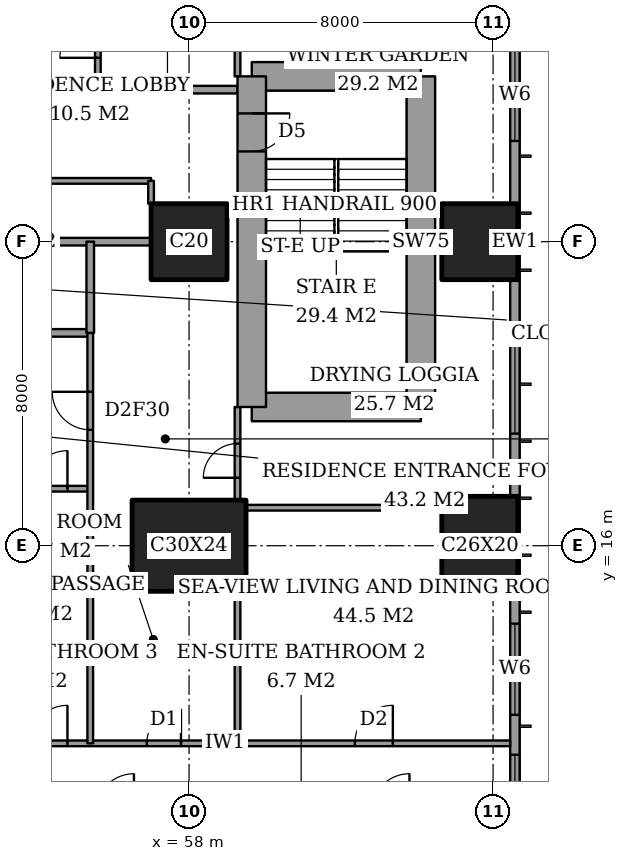
"""IFC4 building model, lengths in metres.
Left out: names, types, materials, properties, quantities, classifications, styles, units other than length and angle.
Written with IfcOpenShell. Run it as: python <this file> out.ifc"""

import sys

from ifc_helpers import new_model, si_unit, direction, frame, frame_2d, origin, origin_2d, place, context, subcontext, project, spatial, rectangle, extrude, element, fill, save


model = new_model("IFC4")
c1 = context("Model", 3, precision=1e-05, world=origin(), true_north=direction((0.0, 1.0)))
c2 = subcontext(c1, "Body", "Model", "MODEL_VIEW")
j1 = project(units=[si_unit("LENGTHUNIT", "METRE"), si_unit("PLANEANGLEUNIT", "RADIAN")], contexts=[c1])
p1 = place(None, origin())
s1 = spatial("IfcSite", under=j1, at=p1, CompositionType="ELEMENT")
p2 = place(p1, origin())
s2 = spatial("IfcBuilding", under=s1, at=p2, CompositionType="ELEMENT")
p3 = place(p2, frame((0.0, 0.0, 51.2)))
s3 = spatial("IfcBuildingStorey", under=s2, at=p3, CompositionType="ELEMENT", Elevation=51.2)
p4 = place(p3, frame((58.0, 16.0, 0.0), z_axis=(0.0, 0.0, 1.0), x_axis=(1.0, 0.0, 0.0)))
e1 = element("IfcColumn", 1, at=p4, inside=s3, PredefinedType="COLUMN", context=c2, shape_type="SweptSolid", body=[
    extrude(rectangle(XDim=3.0, YDim=2.4, at=origin_2d()), origin(), (0.0, 0.0, 1.0), 3.6),
])
p5 = place(p3, frame((58.0, 24.0, 0.0), z_axis=(0.0, 0.0, 1.0), x_axis=(1.0, 0.0, 0.0)))
e2 = element("IfcColumn", 2, at=p5, inside=s3, PredefinedType="COLUMN", context=c2, shape_type="SweptSolid", body=[
    extrude(rectangle(XDim=2.0, YDim=2.0, at=origin_2d()), origin(), (0.0, 0.0, 1.0), 3.6),
])
p6 = place(p3, frame((65.65, 16.0, 0.0), z_axis=(0.0, 0.0, 1.0), x_axis=(0.0, 1.0, 0.0)))
e3 = element("IfcColumn", 3, at=p6, inside=s3, PredefinedType="COLUMN", context=c2, shape_type="SweptSolid", body=[
    extrude(rectangle(XDim=2.6, YDim=2.0, at=origin_2d()), origin(), (0.0, 0.0, 1.0), 3.6),
])
p7 = place(p3, frame((65.65, 24.0, 0.0), z_axis=(0.0, 0.0, 1.0), x_axis=(1.0, 0.0, 0.0)))
e4 = element("IfcColumn", 4, at=p7, inside=s3, PredefinedType="COLUMN", context=c2, shape_type="SweptSolid", body=[
    extrude(rectangle(XDim=2.0, YDim=2.0, at=origin_2d()), origin(), (0.0, 0.0, 1.0), 3.6),
])
p8 = place(p3, frame((59.65, 19.65, 0.0), z_axis=(0.0, 0.0, 1.0), x_axis=(1.0, 0.0, 0.0)))
e5 = element("IfcWall", 5, at=p8, inside=s3, PredefinedType="SHEAR", context=c2, shape_type="SweptSolid", body=[
    extrude(rectangle(XDim=4.45, YDim=0.75, at=frame_2d((2.225, 0.0))), origin(), (0.0, 0.0, 1.0), 3.6),
])
p9 = place(p3, frame((64.1, 19.65, 0.0), z_axis=(0.0, 0.0, 1.0), x_axis=(0.0, 1.0, 0.0)))
e6 = element("IfcWall", 6, at=p9, inside=s3, PredefinedType="SHEAR", context=c2, shape_type="SweptSolid", body=[
    extrude(rectangle(XDim=8.7, YDim=0.75, at=frame_2d((4.35, 0.0))), origin(), (0.0, 0.0, 1.0), 3.6),
])
p10 = place(p3, frame((64.1, 28.35, 0.0), z_axis=(0.0, 0.0, 1.0), x_axis=(-1.0, 0.0, 0.0)))
e7 = element("IfcWall", 7, at=p10, inside=s3, PredefinedType="SHEAR", context=c2, shape_type="SweptSolid", body=[
    extrude(rectangle(XDim=4.45, YDim=0.75, at=frame_2d((2.225, 0.0))), origin(), (0.0, 0.0, 1.0), 3.6),
])
p11 = place(p3, frame((59.65, 28.35, 0.0), z_axis=(0.0, 0.0, 1.0), x_axis=(0.0, -1.0, 0.0)))
e8 = element("IfcWall", 8, at=p11, inside=s3, PredefinedType="SHEAR", context=c2, shape_type="SweptSolid", body=[
    extrude(rectangle(XDim=8.7, YDim=0.75, at=frame_2d((4.35, 0.0))), origin(), (0.0, 0.0, 1.0), 3.6),
])
p12 = place(p11, frame((0.975, 0.0, 0.0)))
e9 = element("IfcOpeningElement", 9, at=p12, cuts=e8, PredefinedType="OPENING", context=c2, shape_type="SweptSolid", body=[
    extrude(rectangle(XDim=1.0, YDim=2.1, at=frame_2d((0.5, 1.05))), frame((0.0, 0.385, 0.0), z_axis=(0.0, -1.0, 0.0), x_axis=(1.0, 0.0, 0.0)), (0.0, 0.0, 1.0), 0.77),
])
p13 = place(p3, frame((66.575, 3.175, 0.0), z_axis=(0.0, 0.0, 1.0), x_axis=(0.0, 1.0, 0.0)))
e10 = element("IfcWall", 10, at=p13, inside=s3, PredefinedType="SOLIDWALL", context=c2, shape_type="SweptSolid", body=[
    extrude(rectangle(XDim=41.65, YDim=0.25, at=frame_2d((20.825, 0.0))), origin(), (0.0, 0.0, 1.0), 3.6),
])
p14 = place(p13, frame((0.775, 0.0, 0.6)))
e11 = element("IfcOpeningElement", 11, at=p14, cuts=e10, PredefinedType="OPENING", context=c2, shape_type="SweptSolid", body=[
    extrude(rectangle(XDim=2.4, YDim=2.0, at=frame_2d((1.2, 1.0))), frame((0.0, 0.135, 0.0), z_axis=(0.0, -1.0, 0.0), x_axis=(1.0, 0.0, 0.0)), (0.0, 0.0, 1.0), 0.27),
])
p15 = place(p13, frame((6.125, 0.0, 0.6)))
e12 = element("IfcOpeningElement", 12, at=p15, cuts=e10, PredefinedType="OPENING", context=c2, shape_type="SweptSolid", body=[
    extrude(rectangle(XDim=1.2, YDim=2.0, at=frame_2d((0.6, 1.0))), frame((0.0, 0.135, 0.0), z_axis=(0.0, -1.0, 0.0), x_axis=(1.0, 0.0, 0.0)), (0.0, 0.0, 1.0), 0.27),
])
p16 = place(p13, frame((8.375, 0.0, 0.6)))
e13 = element("IfcOpeningElement", 13, at=p16, cuts=e10, PredefinedType="OPENING", context=c2, shape_type="SweptSolid", body=[
    extrude(rectangle(XDim=2.4, YDim=2.0, at=frame_2d((1.2, 1.0))), frame((0.0, 0.135, 0.0), z_axis=(0.0, -1.0, 0.0), x_axis=(1.0, 0.0, 0.0)), (0.0, 0.0, 1.0), 0.27),
])
p17 = place(p13, frame((15.775, 0.0, 0.6)))
e14 = element("IfcOpeningElement", 14, at=p17, cuts=e10, PredefinedType="OPENING", context=c2, shape_type="SweptSolid", body=[
    extrude(rectangle(XDim=2.4, YDim=2.0, at=frame_2d((1.2, 1.0))), frame((0.0, 0.135, 0.0), z_axis=(0.0, -1.0, 0.0), x_axis=(1.0, 0.0, 0.0)), (0.0, 0.0, 1.0), 0.27),
])
p18 = place(p13, frame((23.475, 0.0, 0.6)))
e15 = element("IfcOpeningElement", 15, at=p18, cuts=e10, PredefinedType="OPENING", context=c2, shape_type="SweptSolid", body=[
    extrude(rectangle(XDim=2.4, YDim=2.0, at=frame_2d((1.2, 1.0))), frame((0.0, 0.135, 0.0), z_axis=(0.0, -1.0, 0.0), x_axis=(1.0, 0.0, 0.0)), (0.0, 0.0, 1.0), 0.27),
])
p19 = place(p13, frame((30.775, 0.0, 0.6)))
e16 = element("IfcOpeningElement", 16, at=p19, cuts=e10, PredefinedType="OPENING", context=c2, shape_type="SweptSolid", body=[
    extrude(rectangle(XDim=2.4, YDim=2.0, at=frame_2d((1.2, 1.0))), frame((0.0, 0.135, 0.0), z_axis=(0.0, -1.0, 0.0), x_axis=(1.0, 0.0, 0.0)), (0.0, 0.0, 1.0), 0.27),
])
p20 = place(p13, frame((34.125, 0.0, 0.6)))
e17 = element("IfcOpeningElement", 17, at=p20, cuts=e10, PredefinedType="OPENING", context=c2, shape_type="SweptSolid", body=[
    extrude(rectangle(XDim=1.2, YDim=2.0, at=frame_2d((0.6, 1.0))), frame((0.0, 0.135, 0.0), z_axis=(0.0, -1.0, 0.0), x_axis=(1.0, 0.0, 0.0)), (0.0, 0.0, 1.0), 0.27),
])
p21 = place(p13, frame((38.475, 0.0, 0.6)))
e18 = element("IfcOpeningElement", 18, at=p21, cuts=e10, PredefinedType="OPENING", context=c2, shape_type="SweptSolid", body=[
    extrude(rectangle(XDim=2.4, YDim=2.0, at=frame_2d((1.2, 1.0))), frame((0.0, 0.135, 0.0), z_axis=(0.0, -1.0, 0.0), x_axis=(1.0, 0.0, 0.0)), (0.0, 0.0, 1.0), 0.27),
])
p22 = place(p3, frame((41.439, 10.8, 0.0), z_axis=(0.0, 0.0, 1.0), x_axis=(1.0, 0.0, 0.0)))
e19 = element("IfcWall", 19, at=p22, inside=s3, PredefinedType="PARTITIONING", context=c2, shape_type="SweptSolid", body=[
    extrude(rectangle(XDim=25.011, YDim=0.15, at=frame_2d((12.505, 0.0))), origin(), (0.0, 0.0, 1.0), 3.35),
])
p23 = place(p22, frame((12.361, 0.0, 0.0)))
e20 = element("IfcOpeningElement", 20, at=p23, cuts=e19, PredefinedType="OPENING", context=c2, shape_type="SweptSolid", body=[
    extrude(rectangle(XDim=1.0, YDim=2.1, at=frame_2d((0.5, 1.05))), frame((0.0, 0.085, 0.0), z_axis=(0.0, -1.0, 0.0), x_axis=(1.0, 0.0, 0.0)), (0.0, 0.0, 1.0), 0.17),
])
p24 = place(p22, frame((20.924, 0.0, 0.0)))
e21 = element("IfcOpeningElement", 21, at=p24, cuts=e19, PredefinedType="OPENING", context=c2, shape_type="SweptSolid", body=[
    extrude(rectangle(XDim=1.0, YDim=2.1, at=frame_2d((0.5, 1.05))), frame((0.0, 0.085, 0.0), z_axis=(0.0, -1.0, 0.0), x_axis=(1.0, 0.0, 0.0)), (0.0, 0.0, 1.0), 0.17),
])
p25 = place(p22, frame((15.448, 0.0, 0.0)))
e22 = element("IfcOpeningElement", 22, at=p25, cuts=e19, PredefinedType="OPENING", context=c2, shape_type="SweptSolid", body=[
    extrude(rectangle(XDim=0.9, YDim=2.1, at=frame_2d((0.45, 1.05))), frame((0.0, 0.085, 0.0), z_axis=(0.0, -1.0, 0.0), x_axis=(1.0, 0.0, 0.0)), (0.0, 0.0, 1.0), 0.17),
])
p26 = place(p22, frame((9.961, 0.0, 0.0)))
e23 = element("IfcOpeningElement", 23, at=p26, cuts=e19, PredefinedType="OPENING", context=c2, shape_type="SweptSolid", body=[
    extrude(rectangle(XDim=1.0, YDim=2.1, at=frame_2d((0.5, 1.05))), frame((0.0, 0.085, 0.0), z_axis=(0.0, -1.0, 0.0), x_axis=(1.0, 0.0, 0.0)), (0.0, 0.0, 1.0), 0.17),
])
p27 = place(p22, frame((7.361, 0.0, 0.0)))
e24 = element("IfcOpeningElement", 24, at=p27, cuts=e19, PredefinedType="OPENING", context=c2, shape_type="SweptSolid", body=[
    extrude(rectangle(XDim=1.0, YDim=2.1, at=frame_2d((0.5, 1.05))), frame((0.0, 0.085, 0.0), z_axis=(0.0, -1.0, 0.0), x_axis=(1.0, 0.0, 0.0)), (0.0, 0.0, 1.0), 0.17),
])
p28 = place(p22, frame((2.836, 0.0, 0.0)))
e25 = element("IfcOpeningElement", 25, at=p28, cuts=e19, PredefinedType="OPENING", context=c2, shape_type="SweptSolid", body=[
    extrude(rectangle(XDim=1.0, YDim=2.1, at=frame_2d((0.5, 1.05))), frame((0.0, 0.085, 0.0), z_axis=(0.0, -1.0, 0.0), x_axis=(1.0, 0.0, 0.0)), (0.0, 0.0, 1.0), 0.17),
])
p29 = place(p3, frame((55.4, 15.0, 0.0), z_axis=(0.0, 0.0, 1.0), x_axis=(1.0, 0.0, 0.0)))
e26 = element("IfcWall", 26, at=p29, inside=s3, PredefinedType="PARTITIONING", context=c2, shape_type="SweptSolid", body=[
    extrude(rectangle(XDim=1.1, YDim=0.15, at=frame_2d((0.55, 0.0))), origin(), (0.0, 0.0, 1.0), 3.35),
])
p30 = place(p3, frame((59.5, 17.0, 0.0), z_axis=(0.0, 0.0, 1.0), x_axis=(1.0, 0.0, 0.0)))
e27 = element("IfcWall", 27, at=p30, inside=s3, PredefinedType="PARTITIONING", context=c2, shape_type="SweptSolid", body=[
    extrude(rectangle(XDim=5.15, YDim=0.15, at=frame_2d((2.575, 0.0))), origin(), (0.0, 0.0, 1.0), 3.35),
])
p31 = place(p3, frame((51.6, 17.5, 0.0), z_axis=(0.0, 0.0, 1.0), x_axis=(1.0, 0.0, 0.0)))
e28 = element("IfcWall", 28, at=p31, inside=s3, PredefinedType="PARTITIONING", context=c2, shape_type="SweptSolid", body=[
    extrude(rectangle(XDim=3.8, YDim=0.15, at=frame_2d((1.9, 0.0))), origin(), (0.0, 0.0, 1.0), 3.35),
])
p32 = place(p31, frame((2.2, 0.0, 0.0)))
e29 = element("IfcOpeningElement", 29, at=p32, cuts=e28, PredefinedType="OPENING", context=c2, shape_type="SweptSolid", body=[
    extrude(rectangle(XDim=1.0, YDim=2.1, at=frame_2d((0.5, 1.05))), frame((0.0, 0.085, 0.0), z_axis=(0.0, -1.0, 0.0), x_axis=(1.0, 0.0, 0.0)), (0.0, 0.0, 1.0), 0.17),
])
p33 = place(p3, frame((51.2, 21.6, 0.0), z_axis=(0.0, 0.0, 1.0), x_axis=(1.0, 0.0, 0.0)))
e30 = element("IfcWall", 30, at=p33, inside=s3, PredefinedType="PARTITIONING", context=c2, shape_type="SweptSolid", body=[
    extrude(rectangle(XDim=4.2, YDim=0.2, at=frame_2d((2.1, 0.0))), origin(), (0.0, 0.0, 1.0), 3.35),
])
p34 = place(p33, frame((1.65, 0.0, 0.0)))
e31 = element("IfcOpeningElement", 31, at=p34, cuts=e30, PredefinedType="OPENING", context=c2, shape_type="SweptSolid", body=[
    extrude(rectangle(XDim=0.9, YDim=2.1, at=frame_2d((0.45, 1.05))), frame((0.0, 0.11, 0.0), z_axis=(0.0, -1.0, 0.0), x_axis=(1.0, 0.0, 0.0)), (0.0, 0.0, 1.0), 0.22),
])
p35 = place(p3, frame((51.0, 24.0, 0.0), z_axis=(0.0, 0.0, 1.0), x_axis=(1.0, 0.0, 0.0)))
e32 = element("IfcWall", 32, at=p35, inside=s3, PredefinedType="PARTITIONING", context=c2, shape_type="SweptSolid", body=[
    extrude(rectangle(XDim=6.0, YDim=0.2, at=frame_2d((3.0, 0.0))), origin(), (0.0, 0.0, 1.0), 3.35),
])
p36 = place(p3, frame((48.6, 25.6, 0.0), z_axis=(0.0, 0.0, 1.0), x_axis=(1.0, 0.0, 0.0)))
e33 = element("IfcWall", 33, at=p36, inside=s3, PredefinedType="PARTITIONING", context=c2, shape_type="SweptSolid", body=[
    extrude(rectangle(XDim=8.4, YDim=0.15, at=frame_2d((4.2, 0.0))), origin(), (0.0, 0.0, 1.0), 3.35),
])
p37 = place(p36, frame((3.75, 0.0, 0.0)))
e34 = element("IfcOpeningElement", 34, at=p37, cuts=e33, PredefinedType="OPENING", context=c2, shape_type="SweptSolid", body=[
    extrude(rectangle(XDim=0.9, YDim=2.1, at=frame_2d((0.45, 1.05))), frame((0.0, 0.085, 0.0), z_axis=(0.0, -1.0, 0.0), x_axis=(1.0, 0.0, 0.0)), (0.0, 0.0, 1.0), 0.17),
])
p38 = place(p3, frame((42.0, 28.0, 0.0), z_axis=(0.0, 0.0, 1.0), x_axis=(1.0, 0.0, 0.0)))
e35 = element("IfcWall", 35, at=p38, inside=s3, PredefinedType="PARTITIONING", context=c2, shape_type="SweptSolid", body=[
    extrude(rectangle(XDim=17.275, YDim=0.2, at=frame_2d((8.637, 0.0))), origin(), (0.0, 0.0, 1.0), 3.35),
])
p39 = place(p38, frame((9.2, 0.0, 0.0)))
e36 = element("IfcOpeningElement", 36, at=p39, cuts=e35, PredefinedType="OPENING", context=c2, shape_type="SweptSolid", body=[
    extrude(rectangle(XDim=1.2, YDim=2.4, at=frame_2d((0.6, 1.2))), frame((0.0, 0.11, 0.0), z_axis=(0.0, -1.0, 0.0), x_axis=(1.0, 0.0, 0.0)), (0.0, 0.0, 1.0), 0.22),
])
p40 = place(p3, frame((55.4, 21.6, 0.0), z_axis=(0.0, 0.0, 1.0), x_axis=(0.0, 1.0, 0.0)))
e37 = element("IfcWall", 37, at=p40, inside=s3, PredefinedType="PARTITIONING", context=c2, shape_type="SweptSolid", body=[
    extrude(rectangle(XDim=2.4, YDim=0.2, at=frame_2d((1.2, 0.0))), origin(), (0.0, 0.0, 1.0), 3.35),
])
p41 = place(p3, frame((55.4, 10.8, 0.0), z_axis=(0.0, 0.0, 1.0), x_axis=(0.0, 1.0, 0.0)))
e38 = element("IfcWall", 38, at=p41, inside=s3, PredefinedType="PARTITIONING", context=c2, shape_type="SweptSolid", body=[
    extrude(rectangle(XDim=10.8, YDim=0.15, at=frame_2d((5.4, 0.0))), origin(), (0.0, 0.0, 1.0), 3.35),
])
p42 = place(p41, frame((8.25, 0.0, 0.0)))
e39 = element("IfcOpeningElement", 39, at=p42, cuts=e38, PredefinedType="OPENING", context=c2, shape_type="SweptSolid", body=[
    extrude(rectangle(XDim=1.0, YDim=2.1, at=frame_2d((0.5, 1.05))), frame((0.0, 0.085, 0.0), z_axis=(0.0, -1.0, 0.0), x_axis=(1.0, 0.0, 0.0)), (0.0, 0.0, 1.0), 0.17),
])
p43 = place(p3, frame((55.6, 28.0, 0.0), z_axis=(0.0, 0.0, 1.0), x_axis=(0.0, 1.0, 0.0)))
e40 = element("IfcWall", 40, at=p43, inside=s3, PredefinedType="PARTITIONING", context=c2, shape_type="SweptSolid", body=[
    extrude(rectangle(XDim=9.0, YDim=0.15, at=frame_2d((4.5, 0.0))), origin(), (0.0, 0.0, 1.0), 3.35),
])
p44 = place(p43, frame((0.837, 0.0, 0.0)))
e41 = element("IfcOpeningElement", 41, at=p44, cuts=e40, PredefinedType="OPENING", context=c2, shape_type="SweptSolid", body=[
    extrude(rectangle(XDim=1.0, YDim=2.1, at=frame_2d((0.5, 1.05))), frame((0.0, 0.085, 0.0), z_axis=(0.0, -1.0, 0.0), x_axis=(1.0, 0.0, 0.0)), (0.0, 0.0, 1.0), 0.17),
])
p45 = place(p3, frame((57.0, 25.0, 0.0), z_axis=(0.0, 0.0, 1.0), x_axis=(0.0, 1.0, 0.0)))
e42 = element("IfcWall", 42, at=p45, inside=s3, PredefinedType="PARTITIONING", context=c2, shape_type="SweptSolid", body=[
    extrude(rectangle(XDim=0.6, YDim=0.15, at=frame_2d((0.3, 0.0))), origin(), (0.0, 0.0, 1.0), 3.35),
])
p46 = place(p3, frame((59.275, 10.8, 0.0), z_axis=(0.0, 0.0, 1.0), x_axis=(0.0, 1.0, 0.0)))
e43 = element("IfcWall", 43, at=p46, inside=s3, PredefinedType="PARTITIONING", context=c2, shape_type="SweptSolid", body=[
    extrude(rectangle(XDim=4.0, YDim=0.15, at=frame_2d((2.0, 0.0))), origin(), (0.0, 0.0, 1.0), 3.35),
])
p47 = place(p3, frame((59.275, 17.2, 0.0), z_axis=(0.0, 0.0, 1.0), x_axis=(0.0, 1.0, 0.0)))
e44 = element("IfcWall", 44, at=p47, inside=s3, PredefinedType="PARTITIONING", context=c2, shape_type="SweptSolid", body=[
    extrude(rectangle(XDim=2.45, YDim=0.15, at=frame_2d((1.225, 0.0))), origin(), (0.0, 0.0, 1.0), 3.35),
])
p48 = place(p47, frame((0.587, 0.0, 0.0)))
e45 = element("IfcOpeningElement", 45, at=p48, cuts=e44, PredefinedType="OPENING", context=c2, shape_type="SweptSolid", body=[
    extrude(rectangle(XDim=0.9, YDim=2.1, at=frame_2d((0.45, 1.05))), frame((0.0, 0.085, 0.0), z_axis=(0.0, -1.0, 0.0), x_axis=(1.0, 0.0, 0.0)), (0.0, 0.0, 1.0), 0.17),
])
p49 = place(p3, frame((59.275, 28.35, 0.0), z_axis=(0.0, 0.0, 1.0), x_axis=(0.0, 1.0, 0.0)))
e46 = element("IfcWall", 46, at=p49, inside=s3, PredefinedType="PARTITIONING", context=c2, shape_type="SweptSolid", body=[
    extrude(rectangle(XDim=2.45, YDim=0.15, at=frame_2d((1.225, 0.0))), origin(), (0.0, 0.0, 1.0), 3.35),
])
p50 = place(p49, frame((0.913, 0.0, 0.0)))
e47 = element("IfcOpeningElement", 47, at=p50, cuts=e46, PredefinedType="OPENING", context=c2, shape_type="SweptSolid", body=[
    extrude(rectangle(XDim=1.0, YDim=2.1, at=frame_2d((0.5, 1.05))), frame((0.0, 0.085, 0.0), z_axis=(0.0, -1.0, 0.0), x_axis=(1.0, 0.0, 0.0)), (0.0, 0.0, 1.0), 0.17),
])
p51 = place(p15, origin())
e48 = element("IfcWindow", 48, at=p51, inside=s3, PartitioningType="SINGLE_PANEL", PredefinedType="WINDOW", context=c2, shape_type="SweptSolid", body=[
    extrude(rectangle(XDim=1.2, YDim=2.0, at=frame_2d((0.6, 1.0))), frame((0.0, 0.03, 0.0), z_axis=(0.0, -1.0, 0.0), x_axis=(1.0, 0.0, 0.0)), (0.0, 0.0, 1.0), 0.06),
])
fill(e12, e48)
p52 = place(p16, origin())
e49 = element("IfcWindow", 49, at=p52, inside=s3, PartitioningType="SINGLE_PANEL", PredefinedType="WINDOW", context=c2, shape_type="SweptSolid", body=[
    extrude(rectangle(XDim=2.4, YDim=2.0, at=frame_2d((1.2, 1.0))), frame((0.0, 0.03, 0.0), z_axis=(0.0, -1.0, 0.0), x_axis=(1.0, 0.0, 0.0)), (0.0, 0.0, 1.0), 0.06),
])
fill(e13, e49)
p53 = place(p17, origin())
e50 = element("IfcWindow", 50, at=p53, inside=s3, PartitioningType="SINGLE_PANEL", PredefinedType="WINDOW", context=c2, shape_type="SweptSolid", body=[
    extrude(rectangle(XDim=2.4, YDim=2.0, at=frame_2d((1.2, 1.0))), frame((0.0, 0.03, 0.0), z_axis=(0.0, -1.0, 0.0), x_axis=(1.0, 0.0, 0.0)), (0.0, 0.0, 1.0), 0.06),
])
fill(e14, e50)
p54 = place(p18, origin())
e51 = element("IfcWindow", 51, at=p54, inside=s3, PartitioningType="SINGLE_PANEL", PredefinedType="WINDOW", context=c2, shape_type="SweptSolid", body=[
    extrude(rectangle(XDim=2.4, YDim=2.0, at=frame_2d((1.2, 1.0))), frame((0.0, 0.03, 0.0), z_axis=(0.0, -1.0, 0.0), x_axis=(1.0, 0.0, 0.0)), (0.0, 0.0, 1.0), 0.06),
])
fill(e15, e51)
p55 = place(p23, origin())
e52 = element("IfcDoor", 52, at=p55, inside=s3, OperationType="SINGLE_SWING_LEFT", PredefinedType="DOOR", context=c2, shape_type="SweptSolid", body=[
    extrude(rectangle(XDim=1.0, YDim=2.1, at=frame_2d((0.5, 1.05))), frame((0.0, 0.025, 0.0), z_axis=(0.0, -1.0, 0.0), x_axis=(1.0, 0.0, 0.0)), (0.0, 0.0, 1.0), 0.05),
])
fill(e20, e52)
p56 = place(p24, origin())
e53 = element("IfcDoor", 53, at=p56, inside=s3, OperationType="SINGLE_SWING_LEFT", PredefinedType="DOOR", context=c2, shape_type="SweptSolid", body=[
    extrude(rectangle(XDim=1.0, YDim=2.1, at=frame_2d((0.5, 1.05))), frame((0.0, 0.025, 0.0), z_axis=(0.0, -1.0, 0.0), x_axis=(1.0, 0.0, 0.0)), (0.0, 0.0, 1.0), 0.05),
])
fill(e21, e53)
p57 = place(p48, origin())
e54 = element("IfcDoor", 54, at=p57, inside=s3, OperationType="SINGLE_SWING_RIGHT", PredefinedType="DOOR", context=c2, shape_type="SweptSolid", body=[
    extrude(rectangle(XDim=0.9, YDim=2.1, at=frame_2d((0.45, 1.05))), frame((0.0, 0.025, 0.0), z_axis=(0.0, -1.0, 0.0), x_axis=(1.0, 0.0, 0.0)), (0.0, 0.0, 1.0), 0.05),
])
fill(e45, e54)
p58 = place(p25, origin())
e55 = element("IfcDoor", 55, at=p58, inside=s3, OperationType="SINGLE_SWING_LEFT", PredefinedType="DOOR", context=c2, shape_type="SweptSolid", body=[
    extrude(rectangle(XDim=0.9, YDim=2.1, at=frame_2d((0.45, 1.05))), frame((0.0, 0.025, 0.0), z_axis=(0.0, -1.0, 0.0), x_axis=(1.0, 0.0, 0.0)), (0.0, 0.0, 1.0), 0.05),
])
fill(e22, e55)
p59 = place(p42, origin())
e56 = element("IfcDoor", 56, at=p59, inside=s3, OperationType="SINGLE_SWING_LEFT", PredefinedType="DOOR", context=c2, shape_type="SweptSolid", body=[
    extrude(rectangle(XDim=1.0, YDim=2.1, at=frame_2d((0.5, 1.05))), frame((0.0, 0.025, 0.0), z_axis=(0.0, -1.0, 0.0), x_axis=(1.0, 0.0, 0.0)), (0.0, 0.0, 1.0), 0.05),
])
fill(e39, e56)
p60 = place(p32, origin())
e57 = element("IfcDoor", 57, at=p60, inside=s3, OperationType="SINGLE_SWING_LEFT", PredefinedType="DOOR", context=c2, shape_type="SweptSolid", body=[
    extrude(rectangle(XDim=1.0, YDim=2.1, at=frame_2d((0.5, 1.05))), frame((0.0, 0.025, 0.0), z_axis=(0.0, -1.0, 0.0), x_axis=(1.0, 0.0, 0.0)), (0.0, 0.0, 1.0), 0.05),
])
fill(e29, e57)
p61 = place(p44, origin())
e58 = element("IfcDoor", 58, at=p61, inside=s3, OperationType="SINGLE_SWING_RIGHT", PredefinedType="DOOR", context=c2, shape_type="SweptSolid", body=[
    extrude(rectangle(XDim=1.0, YDim=2.1, at=frame_2d((0.5, 1.05))), frame((0.0, 0.025, 0.0), z_axis=(0.0, -1.0, 0.0), x_axis=(1.0, 0.0, 0.0)), (0.0, 0.0, 1.0), 0.05),
])
fill(e41, e58)
p62 = place(p12, origin())
e59 = element("IfcDoor", 59, at=p62, inside=s3, OperationType="SINGLE_SWING_RIGHT", PredefinedType="DOOR", context=c2, shape_type="SweptSolid", body=[
    extrude(rectangle(XDim=1.0, YDim=2.1, at=frame_2d((0.5, 1.05))), frame((0.0, 0.025, 0.0), z_axis=(0.0, -1.0, 0.0), x_axis=(1.0, 0.0, 0.0)), (0.0, 0.0, 1.0), 0.05),
])
fill(e9, e59)
save(model, sys.argv[1])
